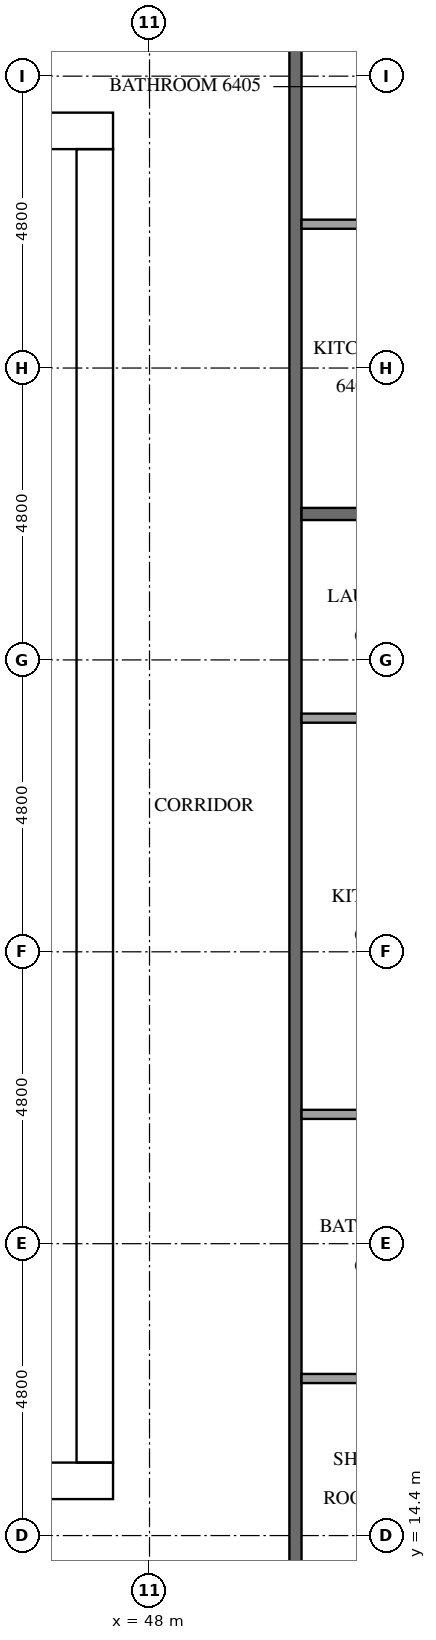
"""IFC4 building model, lengths in metres.
Left out: names, types, materials, properties, quantities, classifications, styles, units other than length and angle.
Written with IfcOpenShell. Run it as: python <this file> out.ifc"""

import sys

from ifc_helpers import new_model, si_unit, direction, frame, frame_2d, origin, place, context, subcontext, project, spatial, rectangle, extrude, element, fill, save


model = new_model("IFC4")
c1 = context("Model", 3, precision=1e-05, world=origin(), true_north=direction((0.0, 1.0)))
c2 = subcontext(c1, "Body", "Model", "MODEL_VIEW")
j1 = project(units=[si_unit("LENGTHUNIT", "METRE"), si_unit("PLANEANGLEUNIT", "RADIAN")], contexts=[c1])
p1 = place(None, origin())
s1 = spatial("IfcSite", under=j1, at=p1, CompositionType="ELEMENT")
p2 = place(p1, origin())
s2 = spatial("IfcBuilding", under=s1, at=p2, CompositionType="ELEMENT")
p3 = place(p2, frame((0.0, 0.0, 245.7)))
s3 = spatial("IfcBuildingStorey", under=s2, at=p3, CompositionType="ELEMENT", Elevation=245.7)
p4 = place(p3, frame((15.0, 15.3, 0.0), z_axis=(0.0, 0.0, 1.0), x_axis=(1.0, 0.0, 0.0)))
e1 = element("IfcWall", 1, at=p4, inside=s3, PredefinedType="SHEAR", context=c2, shape_type="SweptSolid", body=[
    extrude(rectangle(XDim=32.4, YDim=0.6, at=frame_2d((16.2, 0.0))), origin(), (0.0, 0.0, 1.0), 3.2),
])
p5 = place(p4, frame((15.3, 0.0, 0.0)))
e2 = element("IfcOpeningElement", 2, at=p5, cuts=e1, PredefinedType="OPENING", context=c2, shape_type="SweptSolid", body=[
    extrude(rectangle(XDim=1.8, YDim=2.1, at=frame_2d((0.9, 1.05))), frame((0.0, 0.31, 0.0), z_axis=(0.0, -1.0, 0.0), x_axis=(1.0, 0.0, 0.0)), (0.0, 0.0, 1.0), 0.62),
])
p6 = place(p3, frame((15.0, 37.5, 0.0), z_axis=(0.0, 0.0, 1.0), x_axis=(1.0, 0.0, 0.0)))
e3 = element("IfcWall", 3, at=p6, inside=s3, PredefinedType="SHEAR", context=c2, shape_type="SweptSolid", body=[
    extrude(rectangle(XDim=32.4, YDim=0.6, at=frame_2d((16.2, 0.0))), origin(), (0.0, 0.0, 1.0), 3.2),
])
p7 = place(p6, frame((15.3, 0.0, 0.0)))
e4 = element("IfcOpeningElement", 4, at=p7, cuts=e3, PredefinedType="OPENING", context=c2, shape_type="SweptSolid", body=[
    extrude(rectangle(XDim=1.8, YDim=2.1, at=frame_2d((0.9, 1.05))), frame((0.0, 0.31, 0.0), z_axis=(0.0, -1.0, 0.0), x_axis=(1.0, 0.0, 0.0)), (0.0, 0.0, 1.0), 0.62),
])
p8 = place(p6, frame((1.25, 0.0, 0.0)))
e5 = element("IfcOpeningElement", 5, at=p8, cuts=e3, PredefinedType="OPENING", context=c2, shape_type="SweptSolid", body=[
    extrude(rectangle(XDim=1.0, YDim=2.1, at=frame_2d((0.5, 1.05))), frame((0.0, 0.31, 0.0), z_axis=(0.0, -1.0, 0.0), x_axis=(1.0, 0.0, 0.0)), (0.0, 0.0, 1.0), 0.62),
])
p9 = place(p6, frame((4.988, 0.0, 0.0)))
e6 = element("IfcOpeningElement", 6, at=p9, cuts=e3, PredefinedType="OPENING", context=c2, shape_type="SweptSolid", body=[
    extrude(rectangle(XDim=1.0, YDim=2.1, at=frame_2d((0.5, 1.05))), frame((0.0, 0.31, 0.0), z_axis=(0.0, -1.0, 0.0), x_axis=(1.0, 0.0, 0.0)), (0.0, 0.0, 1.0), 0.62),
])
p10 = place(p3, frame((47.1, 15.6, 0.0), z_axis=(0.0, 0.0, 1.0), x_axis=(0.0, 1.0, 0.0)))
e7 = element("IfcWall", 7, at=p10, inside=s3, PredefinedType="SHEAR", context=c2, shape_type="SweptSolid", body=[
    extrude(rectangle(XDim=21.6, YDim=0.6, at=frame_2d((10.8, 0.0))), origin(), (0.0, 0.0, 1.0), 3.2),
])
p11 = place(p10, frame((10.5, 0.0, 0.0)))
e8 = element("IfcOpeningElement", 8, at=p11, cuts=e7, PredefinedType="OPENING", context=c2, shape_type="SweptSolid", body=[
    extrude(rectangle(XDim=1.2, YDim=2.1, at=frame_2d((0.6, 1.05))), frame((0.0, 0.31, 0.0), z_axis=(0.0, -1.0, 0.0), x_axis=(1.0, 0.0, 0.0)), (0.0, 0.0, 1.0), 0.62),
])
p12 = place(p3, frame((50.4, 40.7, 0.0), z_axis=(0.0, 0.0, 1.0), x_axis=(0.0, -1.0, 0.0)))
e9 = element("IfcWall", 9, at=p12, inside=s3, PredefinedType="PARTITIONING", context=c2, shape_type="SweptSolid", body=[
    extrude(rectangle(XDim=28.6, YDim=0.2, at=frame_2d((14.3, 0.0))), origin(), (0.0, 0.0, 1.0), 3.2),
])
p13 = place(p12, frame((27.3, 0.0, 0.0)))
e10 = element("IfcOpeningElement", 10, at=p13, cuts=e9, PredefinedType="OPENING", context=c2, shape_type="SweptSolid", body=[
    extrude(rectangle(XDim=1.1, YDim=2.1, at=frame_2d((0.55, 1.05))), frame((0.0, 0.11, 0.0), z_axis=(0.0, -1.0, 0.0), x_axis=(1.0, 0.0, 0.0)), (0.0, 0.0, 1.0), 0.22),
])
p14 = place(p12, frame((0.25, 0.0, 0.0)))
e11 = element("IfcOpeningElement", 11, at=p14, cuts=e9, PredefinedType="OPENING", context=c2, shape_type="SweptSolid", body=[
    extrude(rectangle(XDim=1.0, YDim=2.1, at=frame_2d((0.5, 1.05))), frame((0.0, 0.11, 0.0), z_axis=(0.0, -1.0, 0.0), x_axis=(1.0, 0.0, 0.0)), (0.0, 0.0, 1.0), 0.22),
])
p15 = place(p3, frame((50.5, 31.2, 0.0), z_axis=(0.0, 0.0, 1.0), x_axis=(1.0, 0.0, 0.0)))
e12 = element("IfcWall", 12, at=p15, inside=s3, PredefinedType="PARTITIONING", context=c2, shape_type="SweptSolid", body=[
    extrude(rectangle(XDim=7.0, YDim=0.2, at=frame_2d((3.5, 0.0))), origin(), (0.0, 0.0, 1.0), 3.2),
])
for number, where, z_axis, x_axis in (
    (13, (50.5, 16.983, 0.0), (0.0, 0.0, 1.0), (1.0, 0.0, 0.0)),
    (14, (50.5, 21.327, 0.0), (0.0, 0.0, 1.0), (1.0, 0.0, 0.0)),
    (15, (50.5, 27.842, 0.0), (0.0, 0.0, 1.0), (1.0, 0.0, 0.0)),
):
    element("IfcWall", number, at=place(p3, frame(where, z_axis=z_axis, x_axis=x_axis)), inside=s3, PredefinedType="PARTITIONING", context=c2, shape_type="SweptSolid", body=[
        extrude(rectangle(XDim=2.375, YDim=0.15, at=frame_2d((1.188, 0.0))), origin(), (0.0, 0.0, 1.0), 3.2),
    ])
p16 = place(p3, frame((50.5, 35.965, 0.0), z_axis=(0.0, 0.0, 1.0), x_axis=(1.0, 0.0, 0.0)))
e16 = element("IfcWall", 16, at=p16, inside=s3, PredefinedType="PARTITIONING", context=c2, shape_type="SweptSolid", body=[
    extrude(rectangle(XDim=1.775, YDim=0.15, at=frame_2d((0.887, 0.0))), origin(), (0.0, 0.0, 1.0), 3.2),
])
p17 = place(p11, origin())
e17 = element("IfcDoor", 17, at=p17, inside=s3, OperationType="SINGLE_SWING_RIGHT", PredefinedType="DOOR", context=c2, shape_type="SweptSolid", body=[
    extrude(rectangle(XDim=1.2, YDim=2.1, at=frame_2d((0.6, 1.05))), frame((0.0, 0.025, 0.0), z_axis=(0.0, -1.0, 0.0), x_axis=(1.0, 0.0, 0.0)), (0.0, 0.0, 1.0), 0.05),
])
fill(e8, e17)
save(model, sys.argv[1])
